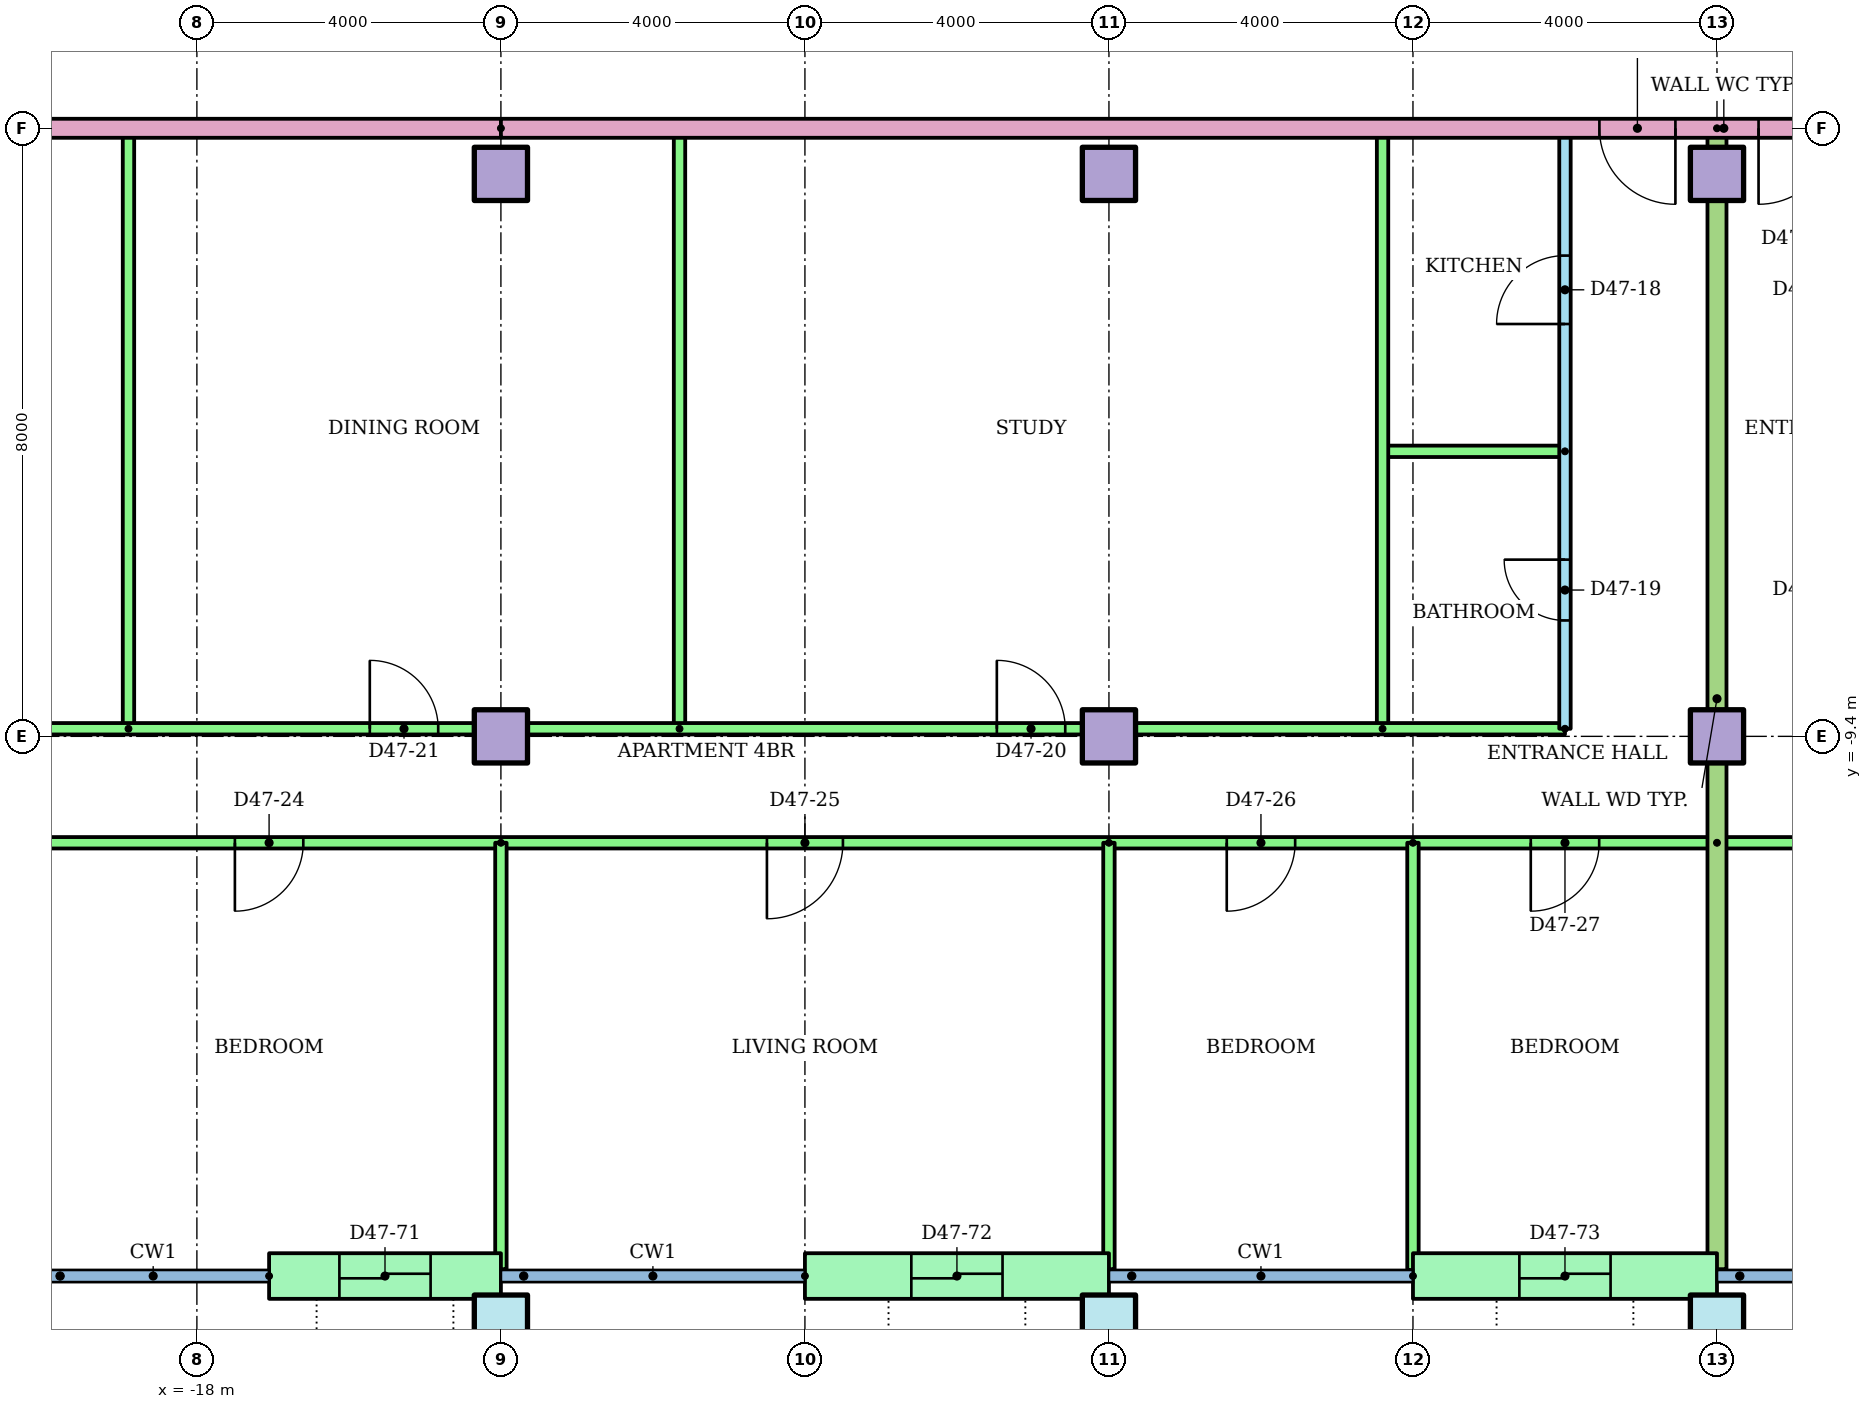
"""IFC4 building model, lengths in metres.
Left out: names, types, materials, properties, quantities, classifications, styles, units other than length and angle.
Written with IfcOpenShell. Run it as: python <this file> out.ifc"""

import sys

from ifc_helpers import new_model, si_unit, direction, frame, frame_2d, origin, origin_2d, place, context, subcontext, project, spatial, rectangle, hollow_rectangle, extrude, element, fill, save


model = new_model("IFC4")
c1 = context("Model", 3, precision=1e-05, world=origin(), true_north=direction((0.0, 1.0)))
c2 = subcontext(c1, "Body", "Model", "MODEL_VIEW")
j1 = project(units=[si_unit("LENGTHUNIT", "METRE"), si_unit("PLANEANGLEUNIT", "RADIAN")], contexts=[c1])
p1 = place(None, origin())
s1 = spatial("IfcSite", under=j1, at=p1, CompositionType="ELEMENT")
p2 = place(p1, origin())
s2 = spatial("IfcBuilding", under=s1, at=p2, CompositionType="ELEMENT")
p3 = place(p2, frame((0.0, 0.0, 181.3)))
s3 = spatial("IfcBuildingStorey", under=s2, at=p3, CompositionType="ELEMENT", Elevation=181.3)
for number, where in (
    (1, (-14.0, -17.1, 0.0)),
    (2, (-6.0, -17.1, 0.0)),
    (3, (2.0, -17.1, 0.0)),
):
    element("IfcColumn", number, at=place(p3, frame(where)), inside=s3, PredefinedType="COLUMN", context=c2, shape_type="SweptSolid", body=[
        extrude(hollow_rectangle(XDim=0.7, YDim=0.7, WallThickness=0.036, at=origin_2d()), origin(), (0.0, 0.0, 1.0), 3.2),
    ])
for number, where in (
    (4, (-14.0, -9.4, 0.0)),
    (5, (-6.0, -9.4, 0.0)),
    (6, (2.0, -9.4, 0.0)),
    (7, (-14.0, -2.0, 0.0)),
    (8, (-6.0, -2.0, 0.0)),
    (9, (2.0, -2.0, 0.0)),
):
    element("IfcColumn", number, at=place(p3, frame(where)), inside=s3, PredefinedType="COLUMN", context=c2, shape_type="SweptSolid", body=[
        extrude(rectangle(XDim=0.7, YDim=0.7, at=origin_2d()), origin(), (0.0, 0.0, 1.0), 3.2),
    ])
p4 = place(p3, frame((-17.05, -16.5, 0.0)))
e10 = element("IfcWall", 10, at=p4, inside=s3, PredefinedType="STANDARD", context=c2, shape_type="SweptSolid", body=[
    extrude(rectangle(XDim=3.05, YDim=0.6, at=frame_2d((1.525, 0.0))), origin(), (0.0, 0.0, 1.0), 2.92),
])
p5 = place(p4, frame((0.925, 0.0, 0.0)))
e11 = element("IfcOpeningElement", 11, at=p5, cuts=e10, PredefinedType="OPENING", context=c2, shape_type="SweptSolid", body=[
    extrude(rectangle(XDim=1.2, YDim=2.1, at=frame_2d((0.6, 1.05))), frame((0.0, 0.31, 0.0), z_axis=(0.0, -1.0, 0.0), x_axis=(1.0, 0.0, 0.0)), (0.0, 0.0, 1.0), 0.62),
])
p6 = place(p3, frame((-10.0, -16.5, 0.0)))
e12 = element("IfcWall", 12, at=p6, inside=s3, PredefinedType="STANDARD", context=c2, shape_type="SweptSolid", body=[
    extrude(rectangle(XDim=4.0, YDim=0.6, at=frame_2d((2.0, 0.0))), origin(), (0.0, 0.0, 1.0), 2.92),
])
p7 = place(p6, frame((1.4, 0.0, 0.0)))
e13 = element("IfcOpeningElement", 13, at=p7, cuts=e12, PredefinedType="OPENING", context=c2, shape_type="SweptSolid", body=[
    extrude(rectangle(XDim=1.2, YDim=2.1, at=frame_2d((0.6, 1.05))), frame((0.0, 0.31, 0.0), z_axis=(0.0, -1.0, 0.0), x_axis=(1.0, 0.0, 0.0)), (0.0, 0.0, 1.0), 0.62),
])
p8 = place(p3, frame((-2.0, -16.5, 0.0)))
e14 = element("IfcWall", 14, at=p8, inside=s3, PredefinedType="STANDARD", context=c2, shape_type="SweptSolid", body=[
    extrude(rectangle(XDim=4.0, YDim=0.6, at=frame_2d((2.0, 0.0))), origin(), (0.0, 0.0, 1.0), 2.92),
])
p9 = place(p8, frame((1.4, 0.0, 0.0)))
e15 = element("IfcOpeningElement", 15, at=p9, cuts=e14, PredefinedType="OPENING", context=c2, shape_type="SweptSolid", body=[
    extrude(rectangle(XDim=1.2, YDim=2.1, at=frame_2d((0.6, 1.05))), frame((0.0, 0.31, 0.0), z_axis=(0.0, -1.0, 0.0), x_axis=(1.0, 0.0, 0.0)), (0.0, 0.0, 1.0), 0.62),
])
p10 = place(p3, frame((0.0, -9.3, 0.0), z_axis=(0.0, 0.0, 1.0), x_axis=(0.0, 1.0, 0.0)))
e16 = element("IfcWall", 16, at=p10, inside=s3, PredefinedType="PARTITIONING", context=c2, shape_type="SweptSolid", body=[
    extrude(rectangle(XDim=7.9, YDim=0.15, at=frame_2d((3.95, 0.0))), origin(), (0.0, 0.0, 1.0), 2.4),
])
p11 = place(p10, frame((5.325, 0.0, 0.0)))
e17 = element("IfcOpeningElement", 17, at=p11, cuts=e16, PredefinedType="OPENING", context=c2, shape_type="SweptSolid", body=[
    extrude(rectangle(XDim=0.9, YDim=2.1, at=frame_2d((0.45, 1.05))), frame((0.0, 0.085, 0.0), z_axis=(0.0, -1.0, 0.0), x_axis=(1.0, 0.0, 0.0)), (0.0, 0.0, 1.0), 0.17),
])
p12 = place(p10, frame((1.425, 0.0, 0.0)))
e18 = element("IfcOpeningElement", 18, at=p12, cuts=e16, PredefinedType="OPENING", context=c2, shape_type="SweptSolid", body=[
    extrude(rectangle(XDim=0.8, YDim=2.1, at=frame_2d((0.4, 1.05))), frame((0.0, 0.085, 0.0), z_axis=(0.0, -1.0, 0.0), x_axis=(1.0, 0.0, 0.0)), (0.0, 0.0, 1.0), 0.17),
])
p13 = place(p3, frame((0.0, -5.65, 0.0), z_axis=(0.0, 0.0, 1.0), x_axis=(-1.0, 0.0, 0.0)))
e19 = element("IfcWall", 19, at=p13, inside=s3, PredefinedType="PARTITIONING", context=c2, shape_type="SweptSolid", body=[
    extrude(rectangle(XDim=2.4, YDim=0.15, at=frame_2d((1.2, 0.0))), origin(), (0.0, 0.0, 1.0), 2.4),
])
for number, where, z_axis, x_axis in (
    (20, (-2.4, -9.3, 0.0), (0.0, 0.0, 1.0), (0.0, 1.0, 0.0)),
    (21, (-11.65, -9.3, 0.0), (0.0, 0.0, 1.0), (0.0, 1.0, 0.0)),
    (22, (-18.9, -9.3, 0.0), (0.0, 0.0, 1.0), (0.0, 1.0, 0.0)),
):
    element("IfcWall", number, at=place(p3, frame(where, z_axis=z_axis, x_axis=x_axis)), inside=s3, PredefinedType="PARTITIONING", context=c2, shape_type="SweptSolid", body=[
        extrude(rectangle(XDim=7.9, YDim=0.15, at=frame_2d((3.95, 0.0))), origin(), (0.0, 0.0, 1.0), 2.4),
    ])
p14 = place(p3, frame((-24.81, -9.3, 0.0)))
e23 = element("IfcWall", 23, at=p14, inside=s3, PredefinedType="PARTITIONING", context=c2, shape_type="SweptSolid", body=[
    extrude(rectangle(XDim=24.81, YDim=0.15, at=frame_2d((12.405, 0.0))), origin(), (0.0, 0.0, 1.0), 2.4),
])
p15 = place(p14, frame((17.335, 0.0, 0.0)))
e24 = element("IfcOpeningElement", 24, at=p15, cuts=e23, PredefinedType="OPENING", context=c2, shape_type="SweptSolid", body=[
    extrude(rectangle(XDim=0.9, YDim=2.1, at=frame_2d((0.45, 1.05))), frame((0.0, 0.085, 0.0), z_axis=(0.0, -1.0, 0.0), x_axis=(1.0, 0.0, 0.0)), (0.0, 0.0, 1.0), 0.17),
])
p16 = place(p14, frame((9.085, 0.0, 0.0)))
e25 = element("IfcOpeningElement", 25, at=p16, cuts=e23, PredefinedType="OPENING", context=c2, shape_type="SweptSolid", body=[
    extrude(rectangle(XDim=0.9, YDim=2.1, at=frame_2d((0.45, 1.05))), frame((0.0, 0.085, 0.0), z_axis=(0.0, -1.0, 0.0), x_axis=(1.0, 0.0, 0.0)), (0.0, 0.0, 1.0), 0.17),
])
p17 = place(p14, frame((3.357, 0.0, 0.0)))
e26 = element("IfcOpeningElement", 26, at=p17, cuts=e23, PredefinedType="OPENING", context=c2, shape_type="SweptSolid", body=[
    extrude(rectangle(XDim=0.9, YDim=2.1, at=frame_2d((0.45, 1.05))), frame((0.0, 0.085, 0.0), z_axis=(0.0, -1.0, 0.0), x_axis=(1.0, 0.0, 0.0)), (0.0, 0.0, 1.0), 0.17),
])
p18 = place(p3, frame((2.0, -10.8, 0.0), z_axis=(0.0, 0.0, 1.0), x_axis=(-1.0, 0.0, 0.0)))
e27 = element("IfcWall", 27, at=p18, inside=s3, PredefinedType="PARTITIONING", context=c2, shape_type="SweptSolid", body=[
    extrude(rectangle(XDim=26.82, YDim=0.15, at=frame_2d((13.41, 0.0))), origin(), (0.0, 0.0, 1.0), 2.4),
])
p19 = place(p18, frame((24.547, 0.0, 0.0)))
e28 = element("IfcOpeningElement", 28, at=p19, cuts=e27, PredefinedType="OPENING", context=c2, shape_type="SweptSolid", body=[
    extrude(rectangle(XDim=0.9, YDim=2.1, at=frame_2d((0.45, 1.05))), frame((0.0, 0.085, 0.0), z_axis=(0.0, -1.0, 0.0), x_axis=(1.0, 0.0, 0.0)), (0.0, 0.0, 1.0), 0.17),
])
p20 = place(p18, frame((18.6, 0.0, 0.0)))
e29 = element("IfcOpeningElement", 29, at=p20, cuts=e27, PredefinedType="OPENING", context=c2, shape_type="SweptSolid", body=[
    extrude(rectangle(XDim=0.9, YDim=2.1, at=frame_2d((0.45, 1.05))), frame((0.0, 0.085, 0.0), z_axis=(0.0, -1.0, 0.0), x_axis=(1.0, 0.0, 0.0)), (0.0, 0.0, 1.0), 0.17),
])
p21 = place(p18, frame((11.5, 0.0, 0.0)))
e30 = element("IfcOpeningElement", 30, at=p21, cuts=e27, PredefinedType="OPENING", context=c2, shape_type="SweptSolid", body=[
    extrude(rectangle(XDim=1.0, YDim=2.1, at=frame_2d((0.5, 1.05))), frame((0.0, 0.085, 0.0), z_axis=(0.0, -1.0, 0.0), x_axis=(1.0, 0.0, 0.0)), (0.0, 0.0, 1.0), 0.17),
])
p22 = place(p18, frame((5.55, 0.0, 0.0)))
e31 = element("IfcOpeningElement", 31, at=p22, cuts=e27, PredefinedType="OPENING", context=c2, shape_type="SweptSolid", body=[
    extrude(rectangle(XDim=0.9, YDim=2.1, at=frame_2d((0.45, 1.05))), frame((0.0, 0.085, 0.0), z_axis=(0.0, -1.0, 0.0), x_axis=(1.0, 0.0, 0.0)), (0.0, 0.0, 1.0), 0.17),
])
p23 = place(p18, frame((1.55, 0.0, 0.0)))
e32 = element("IfcOpeningElement", 32, at=p23, cuts=e27, PredefinedType="OPENING", context=c2, shape_type="SweptSolid", body=[
    extrude(rectangle(XDim=0.9, YDim=2.1, at=frame_2d((0.45, 1.05))), frame((0.0, 0.085, 0.0), z_axis=(0.0, -1.0, 0.0), x_axis=(1.0, 0.0, 0.0)), (0.0, 0.0, 1.0), 0.17),
])
for number, where, z_axis, x_axis in (
    (33, (-14.0, -10.8, 0.0), (0.0, 0.0, 1.0), (0.0, -1.0, 0.0)),
    (34, (-6.0, -10.8, 0.0), (0.0, 0.0, 1.0), (0.0, -1.0, 0.0)),
):
    element("IfcWall", number, at=place(p3, frame(where, z_axis=z_axis, x_axis=x_axis)), inside=s3, PredefinedType="PARTITIONING", context=c2, shape_type="SweptSolid", body=[
        extrude(rectangle(XDim=5.61, YDim=0.15, at=frame_2d((2.805, 0.0))), origin(), (0.0, 0.0, 1.0), 2.4),
    ])
p24 = place(p3, frame((-2.0, -10.8, 0.0), z_axis=(0.0, 0.0, 1.0), x_axis=(0.0, -1.0, 0.0)))
e35 = element("IfcWall", 35, at=p24, inside=s3, PredefinedType="PARTITIONING", context=c2, shape_type="SweptSolid", body=[
    extrude(rectangle(XDim=5.621, YDim=0.15, at=frame_2d((2.811, 0.0))), origin(), (0.0, 0.0, 1.0), 2.4),
])
p25 = place(p3, frame((18.0, -10.8, 0.0), z_axis=(0.0, 0.0, 1.0), x_axis=(-1.0, 0.0, 0.0)))
e36 = element("IfcWall", 36, at=p25, inside=s3, PredefinedType="PARTITIONING", context=c2, shape_type="SweptSolid", body=[
    extrude(rectangle(XDim=16.0, YDim=0.15, at=frame_2d((8.0, 0.0))), origin(), (0.0, 0.0, 1.0), 2.4),
])
p26 = place(p25, frame((13.55, 0.0, 0.0)))
e37 = element("IfcOpeningElement", 37, at=p26, cuts=e36, PredefinedType="OPENING", context=c2, shape_type="SweptSolid", body=[
    extrude(rectangle(XDim=0.9, YDim=2.1, at=frame_2d((0.45, 1.05))), frame((0.0, 0.085, 0.0), z_axis=(0.0, -1.0, 0.0), x_axis=(1.0, 0.0, 0.0)), (0.0, 0.0, 1.0), 0.17),
])
p27 = place(p25, frame((9.5, 0.0, 0.0)))
e38 = element("IfcOpeningElement", 38, at=p27, cuts=e36, PredefinedType="OPENING", context=c2, shape_type="SweptSolid", body=[
    extrude(rectangle(XDim=1.0, YDim=2.1, at=frame_2d((0.5, 1.05))), frame((0.0, 0.085, 0.0), z_axis=(0.0, -1.0, 0.0), x_axis=(1.0, 0.0, 0.0)), (0.0, 0.0, 1.0), 0.17),
])
p28 = place(p25, frame((5.55, 0.0, 0.0)))
e39 = element("IfcOpeningElement", 39, at=p28, cuts=e36, PredefinedType="OPENING", context=c2, shape_type="SweptSolid", body=[
    extrude(rectangle(XDim=0.9, YDim=2.1, at=frame_2d((0.45, 1.05))), frame((0.0, 0.085, 0.0), z_axis=(0.0, -1.0, 0.0), x_axis=(1.0, 0.0, 0.0)), (0.0, 0.0, 1.0), 0.17),
])
p29 = place(p25, frame((1.55, 0.0, 0.0)))
e40 = element("IfcOpeningElement", 40, at=p29, cuts=e36, PredefinedType="OPENING", context=c2, shape_type="SweptSolid", body=[
    extrude(rectangle(XDim=0.9, YDim=2.1, at=frame_2d((0.45, 1.05))), frame((0.0, 0.085, 0.0), z_axis=(0.0, -1.0, 0.0), x_axis=(1.0, 0.0, 0.0)), (0.0, 0.0, 1.0), 0.17),
])
p30 = place(p3, frame((2.0, -1.4, 0.0), z_axis=(0.0, 0.0, 1.0), x_axis=(0.0, -1.0, 0.0)))
e41 = element("IfcWall", 41, at=p30, inside=s3, PredefinedType="PARTITIONING", context=c2, shape_type="SweptSolid", body=[
    extrude(rectangle(XDim=15.01, YDim=0.25, at=frame_2d((7.505, 0.0))), origin(), (0.0, 0.0, 1.0), 2.4),
])
p31 = place(p3, frame((-14.0, -1.4, 0.0), z_axis=(0.0, 0.0, 1.0), x_axis=(-1.0, 0.0, 0.0)))
e42 = element("IfcWall", 42, at=p31, inside=s3, PredefinedType="PARTITIONING", context=c2, shape_type="SweptSolid", body=[
    extrude(rectangle(XDim=10.82, YDim=0.25, at=frame_2d((5.41, 0.0))), origin(), (0.0, 0.0, 1.0), 2.4),
])
p32 = place(p3, frame((14.0, -1.4, 0.0), z_axis=(0.0, 0.0, 1.0), x_axis=(-1.0, 0.0, 0.0)))
e43 = element("IfcWall", 43, at=p32, inside=s3, PredefinedType="PARTITIONING", context=c2, shape_type="SweptSolid", body=[
    extrude(rectangle(XDim=28.0, YDim=0.25, at=frame_2d((14.0, 0.0))), origin(), (0.0, 0.0, 1.0), 2.4),
])
p33 = place(p32, frame((12.547, 0.0, 0.0)))
e44 = element("IfcOpeningElement", 44, at=p33, cuts=e43, PredefinedType="OPENING", context=c2, shape_type="SweptSolid", body=[
    extrude(rectangle(XDim=1.0, YDim=2.1, at=frame_2d((0.5, 1.05))), frame((0.0, 0.135, 0.0), z_axis=(0.0, -1.0, 0.0), x_axis=(1.0, 0.0, 0.0)), (0.0, 0.0, 1.0), 0.27),
])
p34 = place(p32, frame((10.453, 0.0, 0.0)))
e45 = element("IfcOpeningElement", 45, at=p34, cuts=e43, PredefinedType="OPENING", context=c2, shape_type="SweptSolid", body=[
    extrude(rectangle(XDim=1.0, YDim=2.1, at=frame_2d((0.5, 1.05))), frame((0.0, 0.135, 0.0), z_axis=(0.0, -1.0, 0.0), x_axis=(1.0, 0.0, 0.0)), (0.0, 0.0, 1.0), 0.27),
])
p35 = place(p11, origin())
e46 = element("IfcDoor", 46, at=p35, inside=s3, OperationType="SINGLE_SWING_LEFT", PredefinedType="DOOR", context=c2, shape_type="SweptSolid", body=[
    extrude(rectangle(XDim=0.9, YDim=2.1, at=frame_2d((0.45, 1.05))), frame((0.0, 0.025, 0.0), z_axis=(0.0, -1.0, 0.0), x_axis=(1.0, 0.0, 0.0)), (0.0, 0.0, 1.0), 0.05),
])
fill(e17, e46)
p36 = place(p12, origin())
e47 = element("IfcDoor", 47, at=p36, inside=s3, OperationType="SINGLE_SWING_RIGHT", PredefinedType="DOOR", context=c2, shape_type="SweptSolid", body=[
    extrude(rectangle(XDim=0.8, YDim=2.1, at=frame_2d((0.4, 1.05))), frame((0.0, 0.025, 0.0), z_axis=(0.0, -1.0, 0.0), x_axis=(1.0, 0.0, 0.0)), (0.0, 0.0, 1.0), 0.05),
])
fill(e18, e47)
p37 = place(p15, origin())
e48 = element("IfcDoor", 48, at=p37, inside=s3, OperationType="SINGLE_SWING_LEFT", PredefinedType="DOOR", context=c2, shape_type="SweptSolid", body=[
    extrude(rectangle(XDim=0.9, YDim=2.1, at=frame_2d((0.45, 1.05))), frame((0.0, 0.025, 0.0), z_axis=(0.0, -1.0, 0.0), x_axis=(1.0, 0.0, 0.0)), (0.0, 0.0, 1.0), 0.05),
])
fill(e24, e48)
p38 = place(p16, origin())
e49 = element("IfcDoor", 49, at=p38, inside=s3, OperationType="SINGLE_SWING_LEFT", PredefinedType="DOOR", context=c2, shape_type="SweptSolid", body=[
    extrude(rectangle(XDim=0.9, YDim=2.1, at=frame_2d((0.45, 1.05))), frame((0.0, 0.025, 0.0), z_axis=(0.0, -1.0, 0.0), x_axis=(1.0, 0.0, 0.0)), (0.0, 0.0, 1.0), 0.05),
])
fill(e25, e49)
p39 = place(p20, origin())
e50 = element("IfcDoor", 50, at=p39, inside=s3, OperationType="SINGLE_SWING_RIGHT", PredefinedType="DOOR", context=c2, shape_type="SweptSolid", body=[
    extrude(rectangle(XDim=0.9, YDim=2.1, at=frame_2d((0.45, 1.05))), frame((0.0, 0.025, 0.0), z_axis=(0.0, -1.0, 0.0), x_axis=(1.0, 0.0, 0.0)), (0.0, 0.0, 1.0), 0.05),
])
fill(e29, e50)
p40 = place(p21, origin())
e51 = element("IfcDoor", 51, at=p40, inside=s3, OperationType="SINGLE_SWING_RIGHT", PredefinedType="DOOR", context=c2, shape_type="SweptSolid", body=[
    extrude(rectangle(XDim=1.0, YDim=2.1, at=frame_2d((0.5, 1.05))), frame((0.0, 0.025, 0.0), z_axis=(0.0, -1.0, 0.0), x_axis=(1.0, 0.0, 0.0)), (0.0, 0.0, 1.0), 0.05),
])
fill(e30, e51)
p41 = place(p22, origin())
e52 = element("IfcDoor", 52, at=p41, inside=s3, OperationType="SINGLE_SWING_RIGHT", PredefinedType="DOOR", context=c2, shape_type="SweptSolid", body=[
    extrude(rectangle(XDim=0.9, YDim=2.1, at=frame_2d((0.45, 1.05))), frame((0.0, 0.025, 0.0), z_axis=(0.0, -1.0, 0.0), x_axis=(1.0, 0.0, 0.0)), (0.0, 0.0, 1.0), 0.05),
])
fill(e31, e52)
p42 = place(p23, origin())
e53 = element("IfcDoor", 53, at=p42, inside=s3, OperationType="SINGLE_SWING_RIGHT", PredefinedType="DOOR", context=c2, shape_type="SweptSolid", body=[
    extrude(rectangle(XDim=0.9, YDim=2.1, at=frame_2d((0.45, 1.05))), frame((0.0, 0.025, 0.0), z_axis=(0.0, -1.0, 0.0), x_axis=(1.0, 0.0, 0.0)), (0.0, 0.0, 1.0), 0.05),
])
fill(e32, e53)
p43 = place(p33, origin())
e54 = element("IfcDoor", 54, at=p43, inside=s3, OperationType="SINGLE_SWING_LEFT", PredefinedType="DOOR", context=c2, shape_type="SweptSolid", body=[
    extrude(rectangle(XDim=1.0, YDim=2.1, at=frame_2d((0.5, 1.05))), frame((0.0, 0.025, 0.0), z_axis=(0.0, -1.0, 0.0), x_axis=(1.0, 0.0, 0.0)), (0.0, 0.0, 1.0), 0.05),
])
fill(e44, e54)
p44 = place(p34, origin())
e55 = element("IfcDoor", 55, at=p44, inside=s3, OperationType="SINGLE_SWING_RIGHT", PredefinedType="DOOR", context=c2, shape_type="SweptSolid", body=[
    extrude(rectangle(XDim=1.0, YDim=2.1, at=frame_2d((0.5, 1.05))), frame((0.0, 0.025, 0.0), z_axis=(0.0, -1.0, 0.0), x_axis=(1.0, 0.0, 0.0)), (0.0, 0.0, 1.0), 0.05),
])
fill(e45, e55)
p45 = place(p5, origin())
e56 = element("IfcDoor", 56, at=p45, inside=s3, OperationType="SLIDING_TO_LEFT", PredefinedType="DOOR", context=c2, shape_type="SweptSolid", body=[
    extrude(rectangle(XDim=1.2, YDim=2.1, at=frame_2d((0.6, 1.05))), frame((0.0, 0.025, 0.0), z_axis=(0.0, -1.0, 0.0), x_axis=(1.0, 0.0, 0.0)), (0.0, 0.0, 1.0), 0.05),
])
fill(e11, e56)
p46 = place(p7, origin())
e57 = element("IfcDoor", 57, at=p46, inside=s3, OperationType="SLIDING_TO_LEFT", PredefinedType="DOOR", context=c2, shape_type="SweptSolid", body=[
    extrude(rectangle(XDim=1.2, YDim=2.1, at=frame_2d((0.6, 1.05))), frame((0.0, 0.025, 0.0), z_axis=(0.0, -1.0, 0.0), x_axis=(1.0, 0.0, 0.0)), (0.0, 0.0, 1.0), 0.05),
])
fill(e13, e57)
p47 = place(p9, origin())
e58 = element("IfcDoor", 58, at=p47, inside=s3, OperationType="SLIDING_TO_LEFT", PredefinedType="DOOR", context=c2, shape_type="SweptSolid", body=[
    extrude(rectangle(XDim=1.2, YDim=2.1, at=frame_2d((0.6, 1.05))), frame((0.0, 0.025, 0.0), z_axis=(0.0, -1.0, 0.0), x_axis=(1.0, 0.0, 0.0)), (0.0, 0.0, 1.0), 0.05),
])
fill(e15, e58)
save(model, sys.argv[1])
